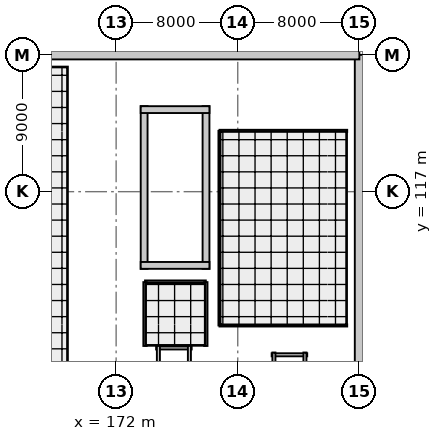
"""IFC4 building model, lengths in metres.
Left out: names, types, materials, properties, quantities, classifications, styles, units other than length and angle.
Written with IfcOpenShell. Run it as: python <this file> out.ifc"""

import sys

from ifc_helpers import new_model, si_unit, direction, frame, frame_2d, origin, origin_2d, place, context, subcontext, project, spatial, rectangle, extrude, element, fill, save


model = new_model("IFC4")
c1 = context("Model", 3, precision=1e-05, world=origin(), true_north=direction((0.0, 1.0)))
c2 = subcontext(c1, "Body", "Model", "MODEL_VIEW")
j1 = project(units=[si_unit("LENGTHUNIT", "METRE"), si_unit("PLANEANGLEUNIT", "RADIAN")], contexts=[c1])
p1 = place(None, origin())
s1 = spatial("IfcSite", under=j1, at=p1, CompositionType="ELEMENT")
p2 = place(p1, origin())
s2 = spatial("IfcBuilding", under=s1, at=p2, CompositionType="ELEMENT")
p3 = place(p2, frame((0.0, 0.0, -5.4)))
s3 = spatial("IfcBuildingStorey", under=s2, at=p3, CompositionType="ELEMENT", Elevation=-5.4)
for number, where, z_axis, x_axis in (
    (1, (172.0, 117.0, 0.0), (0.0, 0.0, 1.0), (1.0, 0.0, 0.0)),
    (2, (172.0, 126.0, 0.0), (0.0, 0.0, 1.0), (1.0, 0.0, 0.0)),
    (3, (180.0, 117.0, 0.0), (0.0, 0.0, 1.0), (1.0, 0.0, 0.0)),
    (4, (180.0, 126.0, 0.0), (0.0, 0.0, 1.0), (1.0, 0.0, 0.0)),
    (5, (188.0, 117.0, 0.0), (0.0, 0.0, 1.0), (1.0, 0.0, 0.0)),
    (6, (188.0, 126.0, 0.0), (0.0, 0.0, 1.0), (1.0, 0.0, 0.0)),
):
    element("IfcColumn", number, at=place(p3, frame(where, z_axis=z_axis, x_axis=x_axis)), inside=s3, PredefinedType="COLUMN", context=c2, shape_type="SweptSolid", body=[
        extrude(rectangle(XDim=1.0, YDim=0.9, at=origin_2d()), origin(), (0.0, 0.0, 1.0), 5.4),
    ])
p4 = place(p3, frame((188.0, 61.2, 0.0), z_axis=(0.0, 0.0, 1.0), x_axis=(0.0, 1.0, 0.0)))
e7 = element("IfcWall", 7, at=p4, inside=s3, PredefinedType="USERDEFINED", context=c2, shape_type="SweptSolid", body=[
    extrude(rectangle(XDim=64.8, YDim=0.6, at=frame_2d((32.4, 0.0))), origin(), (0.0, 0.0, 1.0), 5.1),
])
p5 = place(p3, frame((188.0, 126.0, 0.0), z_axis=(0.0, 0.0, 1.0), x_axis=(-1.0, 0.0, 0.0)))
e8 = element("IfcWall", 8, at=p5, inside=s3, PredefinedType="USERDEFINED", context=c2, shape_type="SweptSolid", body=[
    extrude(rectangle(XDim=52.0, YDim=0.6, at=frame_2d((26.0, 0.0))), origin(), (0.0, 0.0, 1.0), 5.1),
])
for number, where, z_axis, x_axis in (
    (9, (177.913, 111.925, 0.0), (0.0, 0.0, 1.0), (0.0, 1.0, 0.0)),
    (10, (173.843, 122.623, 0.0), (0.0, 0.0, 1.0), (0.0, -1.0, 0.0)),
):
    element("IfcWall", number, at=place(p3, frame(where, z_axis=z_axis, x_axis=x_axis)), inside=s3, PredefinedType="SHEAR", context=c2, shape_type="SweptSolid", body=[
        extrude(rectangle(XDim=10.698, YDim=0.45, at=frame_2d((5.349, 0.0))), origin(), (0.0, 0.0, 1.0), 5.1),
    ])
p6 = place(p3, frame((178.137, 122.397, 0.0), z_axis=(0.0, 0.0, 1.0), x_axis=(-1.0, 0.0, 0.0)))
e11 = element("IfcWall", 11, at=p6, inside=s3, PredefinedType="SHEAR", context=c2, shape_type="SweptSolid", body=[
    extrude(rectangle(XDim=4.52, YDim=0.45, at=frame_2d((2.26, 0.0))), origin(), (0.0, 0.0, 1.0), 5.1),
])
p7 = place(p3, frame((173.617, 112.15, 0.0), z_axis=(0.0, 0.0, 1.0), x_axis=(1.0, 0.0, 0.0)))
e12 = element("IfcWall", 12, at=p7, inside=s3, PredefinedType="SHEAR", context=c2, shape_type="SweptSolid", body=[
    extrude(rectangle(XDim=4.52, YDim=0.45, at=frame_2d((2.26, 0.0))), origin(), (0.0, 0.0, 1.0), 5.1),
])
p8 = place(p7, frame((1.15, 0.0, 0.0)))
e13 = element("IfcOpeningElement", 13, at=p8, cuts=e12, PredefinedType="OPENING", context=c2, shape_type="SweptSolid", body=[
    extrude(rectangle(XDim=1.3, YDim=2.1, at=frame_2d((0.65, 1.05))), frame((0.0, 0.235, 0.0), z_axis=(0.0, -1.0, 0.0), x_axis=(1.0, 0.0, 0.0)), (0.0, 0.0, 1.0), 0.47),
])
p9 = place(p3, frame((176.97, 106.72, 0.0), z_axis=(0.0, 0.0, 1.0), x_axis=(-1.0, 0.0, 0.0)))
e14 = element("IfcWall", 14, at=p9, inside=s3, PredefinedType="SOLIDWALL", context=c2, shape_type="SweptSolid", body=[
    extrude(rectangle(XDim=2.34, YDim=0.2, at=frame_2d((1.17, 0.0))), origin(), (0.0, 0.0, 1.0), 4.4),
])
p10 = place(p9, frame((0.57, 0.0, 0.0)))
e15 = element("IfcOpeningElement", 15, at=p10, cuts=e14, PredefinedType="OPENING", context=c2, shape_type="SweptSolid", body=[
    extrude(rectangle(XDim=1.2, YDim=2.15, at=frame_2d((0.6, 1.075))), frame((0.0, 0.11, 0.0), z_axis=(0.0, -1.0, 0.0), x_axis=(1.0, 0.0, 0.0)), (0.0, 0.0, 1.0), 0.22),
])
for number, where, z_axis, x_axis in (
    (16, (174.78, 106.87, 0.0), (0.0, 0.0, 1.0), (0.0, -1.0, 0.0)),
    (17, (176.82, 103.73, 0.0), (0.0, 0.0, 1.0), (0.0, 1.0, 0.0)),
):
    element("IfcWall", number, at=place(p3, frame(where, z_axis=z_axis, x_axis=x_axis)), inside=s3, PredefinedType="SOLIDWALL", context=c2, shape_type="SweptSolid", body=[
        extrude(rectangle(XDim=3.14, YDim=0.2, at=frame_2d((1.57, 0.0))), origin(), (0.0, 0.0, 1.0), 4.4),
    ])
p11 = place(p3, frame((184.57, 106.27, 0.0), z_axis=(0.0, 0.0, 1.0), x_axis=(-1.0, 0.0, 0.0)))
e18 = element("IfcWall", 18, at=p11, inside=s3, PredefinedType="SOLIDWALL", context=c2, shape_type="SweptSolid", body=[
    extrude(rectangle(XDim=2.34, YDim=0.2, at=frame_2d((1.17, 0.0))), origin(), (0.0, 0.0, 1.0), 4.4),
])
for number, where, z_axis, x_axis in (
    (19, (182.38, 106.42, 0.0), (0.0, 0.0, 1.0), (0.0, -1.0, 0.0)),
    (20, (184.42, 103.58, 0.0), (0.0, 0.0, 1.0), (0.0, 1.0, 0.0)),
):
    element("IfcWall", number, at=place(p3, frame(where, z_axis=z_axis, x_axis=x_axis)), inside=s3, PredefinedType="SOLIDWALL", context=c2, shape_type="SweptSolid", body=[
        extrude(rectangle(XDim=2.84, YDim=0.2, at=frame_2d((1.42, 0.0))), origin(), (0.0, 0.0, 1.0), 4.4),
    ])
p12 = place(p3, frame((187.2, 108.2, 0.0), z_axis=(0.0, 0.0, 1.0), x_axis=(-1.0, 0.0, 0.0)))
e21 = element("IfcWall", 21, at=p12, inside=s3, PredefinedType="PARTITIONING", context=c2, shape_type="SweptSolid", body=[
    extrude(rectangle(XDim=8.4, YDim=0.14, at=frame_2d((4.2, 0.0))), origin(), (0.0, 0.0, 1.0), 4.4),
])
p13 = place(p3, frame((178.8, 121.0, 0.0), z_axis=(0.0, 0.0, 1.0), x_axis=(1.0, 0.0, 0.0)))
e22 = element("IfcWall", 22, at=p13, inside=s3, PredefinedType="PARTITIONING", context=c2, shape_type="SweptSolid", body=[
    extrude(rectangle(XDim=8.4, YDim=0.14, at=frame_2d((4.2, 0.0))), origin(), (0.0, 0.0, 1.0), 4.4),
])
p14 = place(p13, frame((3.55, 0.0, 0.0)))
e23 = element("IfcOpeningElement", 23, at=p14, cuts=e22, PredefinedType="OPENING", context=c2, shape_type="SweptSolid", body=[
    extrude(rectangle(XDim=1.3, YDim=2.1, at=frame_2d((0.65, 1.05))), frame((0.0, 0.08, 0.0), z_axis=(0.0, -1.0, 0.0), x_axis=(1.0, 0.0, 0.0)), (0.0, 0.0, 1.0), 0.16),
])
p15 = place(p3, frame((178.8, 108.2, 0.0), z_axis=(0.0, 0.0, 1.0), x_axis=(0.0, 1.0, 0.0)))
e24 = element("IfcWall", 24, at=p15, inside=s3, PredefinedType="PARTITIONING", context=c2, shape_type="SweptSolid", body=[
    extrude(rectangle(XDim=12.8, YDim=0.14, at=frame_2d((6.4, 0.0))), origin(), (0.0, 0.0, 1.0), 4.4),
])
p16 = place(p3, frame((173.9, 111.05, 0.0), z_axis=(0.0, 0.0, 1.0), x_axis=(1.0, 0.0, 0.0)))
e25 = element("IfcWall", 25, at=p16, inside=s3, PredefinedType="SOLIDWALL", context=c2, shape_type="SweptSolid", body=[
    extrude(rectangle(XDim=4.0, YDim=0.22, at=frame_2d((2.0, 0.0))), origin(), (0.0, 0.0, 1.0), 4.4),
])
p17 = place(p3, frame((173.9, 106.85, 0.0), z_axis=(0.0, 0.0, 1.0), x_axis=(0.0, 1.0, 0.0)))
e26 = element("IfcWall", 26, at=p17, inside=s3, PredefinedType="SOLIDWALL", context=c2, shape_type="SweptSolid", body=[
    extrude(rectangle(XDim=4.2, YDim=0.22, at=frame_2d((2.1, 0.0))), origin(), (0.0, 0.0, 1.0), 4.4),
])
p18 = place(p17, frame((1.4, 0.0, 0.0)))
e27 = element("IfcOpeningElement", 27, at=p18, cuts=e26, PredefinedType="OPENING", context=c2, shape_type="SweptSolid", body=[
    extrude(rectangle(XDim=1.4, YDim=2.1, at=frame_2d((0.7, 1.05))), frame((0.0, 0.12, 0.0), z_axis=(0.0, -1.0, 0.0), x_axis=(1.0, 0.0, 0.0)), (0.0, 0.0, 1.0), 0.24),
])
p19 = place(p3, frame((177.9, 111.05, 0.0), z_axis=(0.0, 0.0, 1.0), x_axis=(0.0, -1.0, 0.0)))
e28 = element("IfcWall", 28, at=p19, inside=s3, PredefinedType="SOLIDWALL", context=c2, shape_type="SweptSolid", body=[
    extrude(rectangle(XDim=4.2, YDim=0.22, at=frame_2d((2.1, 0.0))), origin(), (0.0, 0.0, 1.0), 4.4),
])
p20 = place(p8, origin())
e29 = element("IfcDoor", 29, at=p20, inside=s3, OperationType="SINGLE_SWING_RIGHT", PredefinedType="DOOR", context=c2, shape_type="SweptSolid", body=[
    extrude(rectangle(XDim=1.3, YDim=2.1, at=frame_2d((0.65, 1.05))), frame((0.0, 0.025, 0.0), z_axis=(0.0, -1.0, 0.0), x_axis=(1.0, 0.0, 0.0)), (0.0, 0.0, 1.0), 0.05),
])
fill(e13, e29)
p21 = place(p10, origin())
e30 = element("IfcDoor", 30, at=p21, inside=s3, OperationType="SLIDING_TO_LEFT", PredefinedType="DOOR", context=c2, shape_type="SweptSolid", body=[
    extrude(rectangle(XDim=1.2, YDim=2.15, at=frame_2d((0.6, 1.075))), frame((0.0, 0.025, 0.0), z_axis=(0.0, -1.0, 0.0), x_axis=(1.0, 0.0, 0.0)), (0.0, 0.0, 1.0), 0.05),
])
fill(e15, e30)
p22 = place(p14, origin())
e31 = element("IfcDoor", 31, at=p22, inside=s3, OperationType="SINGLE_SWING_LEFT", PredefinedType="DOOR", context=c2, shape_type="SweptSolid", body=[
    extrude(rectangle(XDim=1.3, YDim=2.1, at=frame_2d((0.65, 1.05))), frame((0.0, 0.025, 0.0), z_axis=(0.0, -1.0, 0.0), x_axis=(1.0, 0.0, 0.0)), (0.0, 0.0, 1.0), 0.05),
])
fill(e23, e31)
p23 = place(p18, origin())
e32 = element("IfcDoor", 32, at=p23, inside=s3, OperationType="SINGLE_SWING_LEFT", PredefinedType="DOOR", context=c2, shape_type="SweptSolid", body=[
    extrude(rectangle(XDim=1.4, YDim=2.1, at=frame_2d((0.7, 1.05))), frame((0.0, 0.025, 0.0), z_axis=(0.0, -1.0, 0.0), x_axis=(1.0, 0.0, 0.0)), (0.0, 0.0, 1.0), 0.05),
])
fill(e27, e32)
save(model, sys.argv[1])
